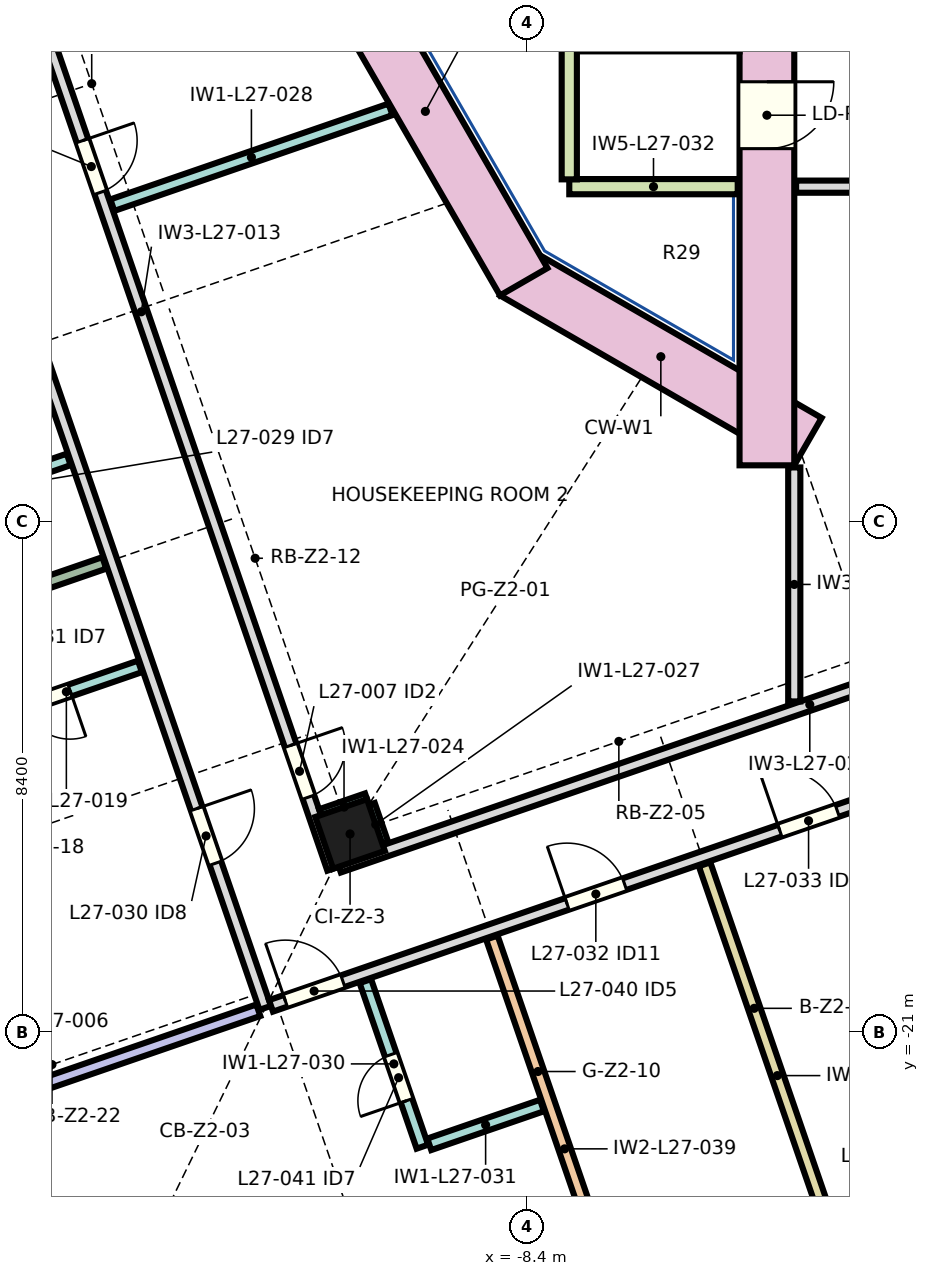
"""IFC4 building model, lengths in metres.
Left out: names, types, materials, properties, quantities, classifications, styles, units other than length and angle.
Written with IfcOpenShell. Run it as: python <this file> out.ifc"""

import sys

from ifc_helpers import new_model, si_unit, direction, frame, frame_2d, origin, origin_2d, place, context, subcontext, project, spatial, rectangle, extrude, element, fill, save


model = new_model("IFC4")
c1 = context("Model", 3, precision=1e-05, world=origin(), true_north=direction((0.0, 1.0)))
c2 = subcontext(c1, "Body", "Model", "MODEL_VIEW")
j1 = project(units=[si_unit("LENGTHUNIT", "METRE"), si_unit("PLANEANGLEUNIT", "RADIAN")], contexts=[c1])
p1 = place(None, origin())
s1 = spatial("IfcSite", under=j1, at=p1, CompositionType="ELEMENT")
p2 = place(p1, origin())
s2 = spatial("IfcBuilding", under=s1, at=p2, CompositionType="ELEMENT")
p3 = place(p2, frame((0.0, 0.0, 130.7)))
s3 = spatial("IfcBuildingStorey", under=s2, at=p3, CompositionType="ELEMENT", Elevation=130.7)
p4 = place(p3, frame((-11.305, -17.695, 0.0), z_axis=(0.0, 0.0, 1.0), x_axis=(0.945518575599, 0.325568154457, 0.0)))
e1 = element("IfcColumn", 1, at=p4, inside=s3, PredefinedType="COLUMN", context=c2, shape_type="SweptSolid", body=[
    extrude(rectangle(XDim=0.9, YDim=0.9, at=origin_2d()), origin(), (0.0, 0.0, 1.0), 3.55),
])
p5 = place(p3, frame((-3.775, -11.243, 0.0), z_axis=(0.0, 0.0, 1.0), x_axis=(-0.866026961591, 0.49999730179, 0.0)))
e2 = element("IfcWall", 2, at=p5, inside=s3, PredefinedType="SHEAR", context=c2, shape_type="SweptSolid", body=[
    extrude(rectangle(XDim=5.587, YDim=0.9, at=frame_2d((2.794, 0.0))), origin(), (0.0, 0.0, 1.0), 3.8),
])
p6 = place(p3, frame((-8.449, -8.614, 0.0), z_axis=(0.0, 0.0, 1.0), x_axis=(-0.499990282633, 0.866031014036, 0.0)))
e3 = element("IfcWall", 3, at=p6, inside=s3, PredefinedType="SHEAR", context=c2, shape_type="SweptSolid", body=[
    extrude(rectangle(XDim=6.47, YDim=0.9, at=frame_2d((3.235, 0.0))), origin(), (0.0, 0.0, 1.0), 3.8),
])
p7 = place(p3, frame((-4.45, 11.633, 0.0), z_axis=(0.0, 0.0, 1.0), x_axis=(0.0, -1.0, 0.0)))
e4 = element("IfcWall", 4, at=p7, inside=s3, PredefinedType="SHEAR", context=c2, shape_type="SweptSolid", body=[
    extrude(rectangle(XDim=23.265, YDim=0.9, at=frame_2d((11.633, 0.0))), origin(), (0.0, 0.0, 1.0), 3.8),
])
p8 = place(p7, frame((14.607, 0.0, 0.0)))
e5 = element("IfcOpeningElement", 5, at=p8, cuts=e4, PredefinedType="OPENING", context=c2, shape_type="SweptSolid", body=[
    extrude(rectangle(XDim=1.1, YDim=2.1, at=frame_2d((0.55, 1.05))), frame((0.0, 0.46, 0.0), z_axis=(0.0, -1.0, 0.0), x_axis=(1.0, 0.0, 0.0)), (0.0, 0.0, 1.0), 0.92),
])
p9 = place(p7, frame((16.958, 0.0, 0.0)))
e6 = element("IfcOpeningElement", 6, at=p9, cuts=e4, PredefinedType="OPENING", context=c2, shape_type="SweptSolid", body=[
    extrude(rectangle(XDim=1.1, YDim=2.1, at=frame_2d((0.55, 1.05))), frame((0.0, 0.46, 0.0), z_axis=(0.0, -1.0, 0.0), x_axis=(1.0, 0.0, 0.0)), (0.0, 0.0, 1.0), 0.92),
])
p10 = place(p7, frame((5.208, 0.0, 0.0)))
e7 = element("IfcOpeningElement", 7, at=p10, cuts=e4, PredefinedType="OPENING", context=c2, shape_type="SweptSolid", body=[
    extrude(rectangle(XDim=1.1, YDim=2.1, at=frame_2d((0.55, 1.05))), frame((0.0, 0.46, 0.0), z_axis=(0.0, -1.0, 0.0), x_axis=(1.0, 0.0, 0.0)), (0.0, 0.0, 1.0), 0.92),
])
p11 = place(p3, frame((-22.63, 8.284, 0.0), z_axis=(0.0, 0.0, 1.0), x_axis=(0.325570542196, -0.945517753431, 0.0)))
e8 = element("IfcWall", 8, at=p11, inside=s3, PredefinedType="PARTITIONING", context=c2, shape_type="SweptSolid", body=[
    extrude(rectangle(XDim=30.5, YDim=0.2, at=frame_2d((15.25, 0.0))), origin(), (0.0, 0.0, 1.0), 3.55),
])
p12 = place(p11, frame((5.07, 0.0, 0.0)))
e9 = element("IfcOpeningElement", 9, at=p12, cuts=e8, PredefinedType="OPENING", context=c2, shape_type="SweptSolid", body=[
    extrude(rectangle(XDim=1.2, YDim=2.1, at=frame_2d((0.6, 1.05))), frame((0.0, 0.11, 0.0), z_axis=(0.0, -1.0, 0.0), x_axis=(1.0, 0.0, 0.0)), (0.0, 0.0, 1.0), 0.22),
])
p13 = place(p11, frame((15.705, 0.0, 0.0)))
e10 = element("IfcOpeningElement", 10, at=p13, cuts=e8, PredefinedType="OPENING", context=c2, shape_type="SweptSolid", body=[
    extrude(rectangle(XDim=0.95, YDim=2.1, at=frame_2d((0.475, 1.05))), frame((0.0, 0.11, 0.0), z_axis=(0.0, -1.0, 0.0), x_axis=(1.0, 0.0, 0.0)), (0.0, 0.0, 1.0), 0.22),
])
p14 = place(p11, frame((27.035, 0.0, 0.0)))
e11 = element("IfcOpeningElement", 11, at=p14, cuts=e8, PredefinedType="OPENING", context=c2, shape_type="SweptSolid", body=[
    extrude(rectangle(XDim=0.95, YDim=2.1, at=frame_2d((0.475, 1.05))), frame((0.0, 0.11, 0.0), z_axis=(0.0, -1.0, 0.0), x_axis=(1.0, 0.0, 0.0)), (0.0, 0.0, 1.0), 0.22),
])
p15 = place(p3, frame((-19.763, -22.987, 0.0), z_axis=(0.0, 0.0, 1.0), x_axis=(0.945511269654, 0.32558937169, 0.0)))
e12 = element("IfcWall", 12, at=p15, inside=s3, PredefinedType="PARTITIONING", context=c2, shape_type="SweptSolid", body=[
    extrude(rectangle(XDim=7.35, YDim=0.2, at=frame_2d((3.675, 0.0))), origin(), (0.0, 0.0, 1.0), 3.55),
])
p16 = place(p3, frame((-18.466, -12.408, 0.0), z_axis=(0.0, 0.0, 1.0), x_axis=(0.94551230217, 0.325586373249, 0.0)))
e13 = element("IfcWall", 13, at=p16, inside=s3, PredefinedType="PARTITIONING", context=c2, shape_type="SweptSolid", body=[
    extrude(rectangle(XDim=2.68, YDim=0.2, at=frame_2d((1.34, 0.0))), origin(), (0.0, 0.0, 1.0), 3.55),
])
p17 = place(p16, frame((0.664, 0.0, 0.0)))
e14 = element("IfcOpeningElement", 14, at=p17, cuts=e13, PredefinedType="OPENING", context=c2, shape_type="SweptSolid", body=[
    extrude(rectangle(XDim=0.8, YDim=2.1, at=frame_2d((0.4, 1.05))), frame((0.0, 0.11, 0.0), z_axis=(0.0, -1.0, 0.0), x_axis=(1.0, 0.0, 0.0)), (0.0, 0.0, 1.0), 0.22),
])
p18 = place(p3, frame((-17.892, 0.051, 0.0), z_axis=(0.0, 0.0, 1.0), x_axis=(0.325580537834, -0.94551431157, 0.0)))
e15 = element("IfcWall", 15, at=p18, inside=s3, PredefinedType="PARTITIONING", context=c2, shape_type="SweptSolid", body=[
    extrude(rectangle(XDim=19.374, YDim=0.2, at=frame_2d((9.687, 0.0))), origin(), (0.0, 0.0, 1.0), 3.55),
])
p19 = place(p18, frame((6.711, 0.0, 0.0)))
e16 = element("IfcOpeningElement", 16, at=p19, cuts=e15, PredefinedType="OPENING", context=c2, shape_type="SweptSolid", body=[
    extrude(rectangle(XDim=0.9, YDim=2.1, at=frame_2d((0.45, 1.05))), frame((0.0, 0.11, 0.0), z_axis=(0.0, -1.0, 0.0), x_axis=(1.0, 0.0, 0.0)), (0.0, 0.0, 1.0), 0.22),
])
p20 = place(p18, frame((17.229, 0.0, 0.0)))
e17 = element("IfcOpeningElement", 17, at=p20, cuts=e15, PredefinedType="OPENING", context=c2, shape_type="SweptSolid", body=[
    extrude(rectangle(XDim=0.9, YDim=2.1, at=frame_2d((0.45, 1.05))), frame((0.0, 0.11, 0.0), z_axis=(0.0, -1.0, 0.0), x_axis=(1.0, 0.0, 0.0)), (0.0, 0.0, 1.0), 0.22),
])
p21 = place(p3, frame((-15.346, -13.238, 0.0), z_axis=(0.0, 0.0, 1.0), x_axis=(-0.945521494984, -0.325559675824, 0.0)))
e18 = element("IfcWall", 18, at=p21, inside=s3, PredefinedType="PARTITIONING", context=c2, shape_type="SweptSolid", body=[
    extrude(rectangle(XDim=7.35, YDim=0.2, at=frame_2d((3.675, 0.0))), origin(), (0.0, 0.0, 1.0), 3.05),
])
p22 = place(p3, frame((-14.76, -14.939, 0.0), z_axis=(0.0, 0.0, 1.0), x_axis=(-0.9455087096, -0.325596805989, 0.0)))
e19 = element("IfcWall", 19, at=p22, inside=s3, PredefinedType="PARTITIONING", context=c2, shape_type="SweptSolid", body=[
    extrude(rectangle(XDim=2.56, YDim=0.2, at=frame_2d((1.28, 0.0))), origin(), (0.0, 0.0, 1.0), 3.55),
])
p23 = place(p22, frame((1.216, 0.0, 0.0)))
e20 = element("IfcOpeningElement", 20, at=p23, cuts=e19, PredefinedType="OPENING", context=c2, shape_type="SweptSolid", body=[
    extrude(rectangle(XDim=0.8, YDim=2.1, at=frame_2d((0.4, 1.05))), frame((0.0, 0.11, 0.0), z_axis=(0.0, -1.0, 0.0), x_axis=(1.0, 0.0, 0.0)), (0.0, 0.0, 1.0), 0.22),
])
p24 = place(p3, frame((-12.605, -20.522, 0.0), z_axis=(0.0, 0.0, 1.0), x_axis=(0.945519651594, 0.325565029526, 0.0)))
e21 = element("IfcWall", 21, at=p24, inside=s3, PredefinedType="PARTITIONING", context=c2, shape_type="SweptSolid", body=[
    extrude(rectangle(XDim=37.3, YDim=0.2, at=frame_2d((18.65, 0.0))), origin(), (0.0, 0.0, 1.0), 3.55),
])
p25 = place(p24, frame((5.15, 0.0, 0.0)))
e22 = element("IfcOpeningElement", 22, at=p25, cuts=e21, PredefinedType="OPENING", context=c2, shape_type="SweptSolid", body=[
    extrude(rectangle(XDim=1.0, YDim=2.1, at=frame_2d((0.5, 1.05))), frame((0.0, 0.11, 0.0), z_axis=(0.0, -1.0, 0.0), x_axis=(1.0, 0.0, 0.0)), (0.0, 0.0, 1.0), 0.22),
])
p26 = place(p24, frame((8.85, 0.0, 0.0)))
e23 = element("IfcOpeningElement", 23, at=p26, cuts=e21, PredefinedType="OPENING", context=c2, shape_type="SweptSolid", body=[
    extrude(rectangle(XDim=1.0, YDim=2.1, at=frame_2d((0.5, 1.05))), frame((0.0, 0.11, 0.0), z_axis=(0.0, -1.0, 0.0), x_axis=(1.0, 0.0, 0.0)), (0.0, 0.0, 1.0), 0.22),
])
p27 = place(p24, frame((12.55, 0.0, 0.0)))
e24 = element("IfcOpeningElement", 24, at=p27, cuts=e21, PredefinedType="OPENING", context=c2, shape_type="SweptSolid", body=[
    extrude(rectangle(XDim=1.0, YDim=2.1, at=frame_2d((0.5, 1.05))), frame((0.0, 0.11, 0.0), z_axis=(0.0, -1.0, 0.0), x_axis=(1.0, 0.0, 0.0)), (0.0, 0.0, 1.0), 0.22),
])
p28 = place(p24, frame((21.05, 0.0, 0.0)))
e25 = element("IfcOpeningElement", 25, at=p28, cuts=e21, PredefinedType="OPENING", context=c2, shape_type="SweptSolid", body=[
    extrude(rectangle(XDim=1.0, YDim=2.1, at=frame_2d((0.5, 1.05))), frame((0.0, 0.11, 0.0), z_axis=(0.0, -1.0, 0.0), x_axis=(1.0, 0.0, 0.0)), (0.0, 0.0, 1.0), 0.22),
])
p29 = place(p24, frame((28.325, 0.0, 0.0)))
e26 = element("IfcOpeningElement", 26, at=p29, cuts=e21, PredefinedType="OPENING", context=c2, shape_type="SweptSolid", body=[
    extrude(rectangle(XDim=0.95, YDim=2.1, at=frame_2d((0.475, 1.05))), frame((0.0, 0.11, 0.0), z_axis=(0.0, -1.0, 0.0), x_axis=(1.0, 0.0, 0.0)), (0.0, 0.0, 1.0), 0.22),
])
p30 = place(p24, frame((0.25, 0.0, 0.0)))
e27 = element("IfcOpeningElement", 27, at=p30, cuts=e21, PredefinedType="OPENING", context=c2, shape_type="SweptSolid", body=[
    extrude(rectangle(XDim=1.0, YDim=2.1, at=frame_2d((0.5, 1.05))), frame((0.0, 0.11, 0.0), z_axis=(0.0, -1.0, 0.0), x_axis=(1.0, 0.0, 0.0)), (0.0, 0.0, 1.0), 0.22),
])
p31 = place(p24, frame((34.25, 0.0, 0.0)))
e28 = element("IfcOpeningElement", 28, at=p31, cuts=e21, PredefinedType="OPENING", context=c2, shape_type="SweptSolid", body=[
    extrude(rectangle(XDim=1.1, YDim=2.1, at=frame_2d((0.55, 1.05))), frame((0.0, 0.11, 0.0), z_axis=(0.0, -1.0, 0.0), x_axis=(1.0, 0.0, 0.0)), (0.0, 0.0, 1.0), 0.22),
])
p32 = place(p3, frame((-11.49, -18.234, 0.0), z_axis=(0.0, 0.0, 1.0), x_axis=(0.945522545762, 0.325556624039, 0.0)))
e29 = element("IfcWall", 29, at=p32, inside=s3, PredefinedType="PARTITIONING", context=c2, shape_type="SweptSolid", body=[
    extrude(rectangle(XDim=16.382, YDim=0.2, at=frame_2d((8.191, 0.0))), origin(), (0.0, 0.0, 1.0), 3.55),
])
p33 = place(p32, frame((11.152, 0.0, 0.0)))
e30 = element("IfcOpeningElement", 30, at=p33, cuts=e29, PredefinedType="OPENING", context=c2, shape_type="SweptSolid", body=[
    extrude(rectangle(XDim=2.0, YDim=2.1, at=frame_2d((1.0, 1.05))), frame((0.0, 0.11, 0.0), z_axis=(0.0, -1.0, 0.0), x_axis=(1.0, 0.0, 0.0)), (0.0, 0.0, 1.0), 0.22),
])
p34 = place(p3, frame((-11.026, -17.123, 0.0), z_axis=(0.0, 0.0, 1.0), x_axis=(-0.945525269499, -0.325548713312, 0.0)))
e31 = element("IfcWall", 31, at=p34, inside=s3, PredefinedType="PARTITIONING", context=c2, shape_type="SweptSolid", body=[
    extrude(rectangle(XDim=0.8, YDim=0.2, at=frame_2d((0.4, 0.0))), origin(), (0.0, 0.0, 1.0), 3.55),
])
p35 = place(p3, frame((-10.772, -17.86, 0.0), z_axis=(0.0, 0.0, 1.0), x_axis=(-0.325691873105, 0.945475966798, 0.0)))
e32 = element("IfcWall", 32, at=p35, inside=s3, PredefinedType="PARTITIONING", context=c2, shape_type="SweptSolid", body=[
    extrude(rectangle(XDim=0.68, YDim=0.2, at=frame_2d((0.34, 0.0))), origin(), (0.0, 0.0, 1.0), 3.55),
])
p36 = place(p3, frame((-10.64, -5.779, 0.0), z_axis=(0.0, 0.0, 1.0), x_axis=(-0.945513394783, -0.325583200253, 0.0)))
e33 = element("IfcWall", 33, at=p36, inside=s3, PredefinedType="PARTITIONING", context=c2, shape_type="SweptSolid", body=[
    extrude(rectangle(XDim=4.838, YDim=0.2, at=frame_2d((2.419, 0.0))), origin(), (0.0, 0.0, 1.0), 3.55),
])
p37 = place(p3, frame((-10.116, -22.838, 0.0), z_axis=(0.0, 0.0, 1.0), x_axis=(-0.325596179186, 0.945508925447, 0.0)))
e34 = element("IfcWall", 34, at=p37, inside=s3, PredefinedType="PARTITIONING", context=c2, shape_type="SweptSolid", body=[
    extrude(rectangle(XDim=2.88, YDim=0.2, at=frame_2d((1.44, 0.0))), origin(), (0.0, 0.0, 1.0), 3.55),
])
p38 = place(p37, frame((0.8, 0.0, 0.0)))
e35 = element("IfcOpeningElement", 35, at=p38, cuts=e34, PredefinedType="OPENING", context=c2, shape_type="SweptSolid", body=[
    extrude(rectangle(XDim=0.8, YDim=2.1, at=frame_2d((0.4, 1.05))), frame((0.0, 0.11, 0.0), z_axis=(0.0, -1.0, 0.0), x_axis=(1.0, 0.0, 0.0)), (0.0, 0.0, 1.0), 0.22),
])
p39 = place(p3, frame((-8.149, -22.16, 0.0), z_axis=(0.0, 0.0, 1.0), x_axis=(-0.945510558394, -0.325591437181, 0.0)))
e36 = element("IfcWall", 36, at=p39, inside=s3, PredefinedType="PARTITIONING", context=c2, shape_type="SweptSolid", body=[
    extrude(rectangle(XDim=1.96, YDim=0.2, at=frame_2d((0.98, 0.0))), origin(), (0.0, 0.0, 1.0), 3.55),
])
p40 = place(p3, frame((-7.7, -7.05, 0.0), z_axis=(0.0, 0.0, 1.0), x_axis=(1.0, 0.0, 0.0)))
e37 = element("IfcWall", 37, at=p40, inside=s3, PredefinedType="SOLIDWALL", context=c2, shape_type="SweptSolid", body=[
    extrude(rectangle(XDim=2.77, YDim=0.25, at=frame_2d((1.385, 0.0))), origin(), (0.0, 0.0, 1.0), 3.55),
])
p41 = place(p3, frame((-7.7, 7.05, 0.0), z_axis=(0.0, 0.0, 1.0), x_axis=(0.0, -1.0, 0.0)))
e38 = element("IfcWall", 38, at=p41, inside=s3, PredefinedType="SOLIDWALL", context=c2, shape_type="SweptSolid", body=[
    extrude(rectangle(XDim=13.98, YDim=0.25, at=frame_2d((6.99, 0.0))), origin(), (0.0, 0.0, 1.0), 3.55),
])
p42 = place(p3, frame((-6.581, -26.348, 0.0), z_axis=(0.0, 0.0, 1.0), x_axis=(-0.325549451152, 0.945525015457, 0.0)))
e39 = element("IfcWall", 39, at=p42, inside=s3, PredefinedType="PARTITIONING", context=c2, shape_type="SweptSolid", body=[
    extrude(rectangle(XDim=7.35, YDim=0.2, at=frame_2d((3.675, 0.0))), origin(), (0.0, 0.0, 1.0), 2.65),
])
p43 = place(p3, frame((-5.475, -18.194, 0.0), z_axis=(0.0, 0.0, 1.0), x_axis=(0.325579146306, -0.945514790731, 0.0)))
e40 = element("IfcWall", 40, at=p43, inside=s3, PredefinedType="PARTITIONING", context=c2, shape_type="SweptSolid", body=[
    extrude(rectangle(XDim=7.35, YDim=0.2, at=frame_2d((3.675, 0.0))), origin(), (0.0, 0.0, 1.0), 3.05),
])
p44 = place(p3, frame((-4.0, -11.667, 0.0), z_axis=(0.0, 0.0, 1.0), x_axis=(0.0, -1.0, 0.0)))
e41 = element("IfcWall", 41, at=p44, inside=s3, PredefinedType="PARTITIONING", context=c2, shape_type="SweptSolid", body=[
    extrude(rectangle(XDim=3.848, YDim=0.2, at=frame_2d((1.924, 0.0))), origin(), (0.0, 0.0, 1.0), 3.55),
])
p45 = place(p3, frame((3.97, -7.05, 0.0), z_axis=(0.0, 0.0, 1.0), x_axis=(-1.0, 0.0, 0.0)))
e42 = element("IfcWall", 42, at=p45, inside=s3, PredefinedType="PARTITIONING", context=c2, shape_type="SweptSolid", body=[
    extrude(rectangle(XDim=7.94, YDim=0.2, at=frame_2d((3.97, 0.0))), origin(), (0.0, 0.0, 1.0), 3.55),
])
p46 = place(p45, frame((2.97, 0.0, 0.0)))
e43 = element("IfcOpeningElement", 43, at=p46, cuts=e42, PredefinedType="OPENING", context=c2, shape_type="SweptSolid", body=[
    extrude(rectangle(XDim=2.0, YDim=2.1, at=frame_2d((1.0, 1.05))), frame((0.0, 0.11, 0.0), z_axis=(0.0, -1.0, 0.0), x_axis=(1.0, 0.0, 0.0)), (0.0, 0.0, 1.0), 0.22),
])
p47 = place(p19, origin())
e44 = element("IfcDoor", 44, at=p47, inside=s3, OperationType="NOTDEFINED", PredefinedType="DOOR", context=c2, shape_type="SweptSolid", body=[
    extrude(rectangle(XDim=0.9, YDim=2.1, at=frame_2d((0.45, 1.05))), frame((0.0, 0.025, 0.0), z_axis=(0.0, -1.0, 0.0), x_axis=(1.0, 0.0, 0.0)), (0.0, 0.0, 1.0), 0.05),
])
fill(e16, e44)
p48 = place(p20, origin())
e45 = element("IfcDoor", 45, at=p48, inside=s3, OperationType="NOTDEFINED", PredefinedType="DOOR", context=c2, shape_type="SweptSolid", body=[
    extrude(rectangle(XDim=0.9, YDim=2.1, at=frame_2d((0.45, 1.05))), frame((0.0, 0.025, 0.0), z_axis=(0.0, -1.0, 0.0), x_axis=(1.0, 0.0, 0.0)), (0.0, 0.0, 1.0), 0.05),
])
fill(e17, e45)
p49 = place(p14, origin())
e46 = element("IfcDoor", 46, at=p49, inside=s3, OperationType="NOTDEFINED", PredefinedType="DOOR", context=c2, shape_type="SweptSolid", body=[
    extrude(rectangle(XDim=0.95, YDim=2.1, at=frame_2d((0.475, 1.05))), frame((0.0, 0.025, 0.0), z_axis=(0.0, -1.0, 0.0), x_axis=(1.0, 0.0, 0.0)), (0.0, 0.0, 1.0), 0.05),
])
fill(e11, e46)
p50 = place(p23, origin())
e47 = element("IfcDoor", 47, at=p50, inside=s3, OperationType="NOTDEFINED", PredefinedType="DOOR", context=c2, shape_type="SweptSolid", body=[
    extrude(rectangle(XDim=0.8, YDim=2.1, at=frame_2d((0.4, 1.05))), frame((0.0, 0.025, 0.0), z_axis=(0.0, -1.0, 0.0), x_axis=(1.0, 0.0, 0.0)), (0.0, 0.0, 1.0), 0.05),
])
fill(e20, e47)
p51 = place(p25, origin())
e48 = element("IfcDoor", 48, at=p51, inside=s3, OperationType="NOTDEFINED", PredefinedType="DOOR", context=c2, shape_type="SweptSolid", body=[
    extrude(rectangle(XDim=1.0, YDim=2.1, at=frame_2d((0.5, 1.05))), frame((0.0, 0.025, 0.0), z_axis=(0.0, -1.0, 0.0), x_axis=(1.0, 0.0, 0.0)), (0.0, 0.0, 1.0), 0.05),
])
fill(e22, e48)
p52 = place(p26, origin())
e49 = element("IfcDoor", 49, at=p52, inside=s3, OperationType="NOTDEFINED", PredefinedType="DOOR", context=c2, shape_type="SweptSolid", body=[
    extrude(rectangle(XDim=1.0, YDim=2.1, at=frame_2d((0.5, 1.05))), frame((0.0, 0.025, 0.0), z_axis=(0.0, -1.0, 0.0), x_axis=(1.0, 0.0, 0.0)), (0.0, 0.0, 1.0), 0.05),
])
fill(e23, e49)
p53 = place(p30, origin())
e50 = element("IfcDoor", 50, at=p53, inside=s3, OperationType="NOTDEFINED", PredefinedType="DOOR", context=c2, shape_type="SweptSolid", body=[
    extrude(rectangle(XDim=1.0, YDim=2.1, at=frame_2d((0.5, 1.05))), frame((0.0, 0.025, 0.0), z_axis=(0.0, -1.0, 0.0), x_axis=(1.0, 0.0, 0.0)), (0.0, 0.0, 1.0), 0.05),
])
fill(e27, e50)
p54 = place(p38, origin())
e51 = element("IfcDoor", 51, at=p54, inside=s3, OperationType="NOTDEFINED", PredefinedType="DOOR", context=c2, shape_type="SweptSolid", body=[
    extrude(rectangle(XDim=0.8, YDim=2.1, at=frame_2d((0.4, 1.05))), frame((0.0, 0.025, 0.0), z_axis=(0.0, -1.0, 0.0), x_axis=(1.0, 0.0, 0.0)), (0.0, 0.0, 1.0), 0.05),
])
fill(e35, e51)
p55 = place(p9, origin())
e52 = element("IfcDoor", 52, at=p55, inside=s3, OperationType="SLIDING_TO_LEFT", PredefinedType="DOOR", context=c2, shape_type="SweptSolid", body=[
    extrude(rectangle(XDim=1.1, YDim=2.1, at=frame_2d((0.55, 1.05))), frame((0.0, 0.025, 0.0), z_axis=(0.0, -1.0, 0.0), x_axis=(1.0, 0.0, 0.0)), (0.0, 0.0, 1.0), 0.05),
])
fill(e6, e52)
save(model, sys.argv[1])
